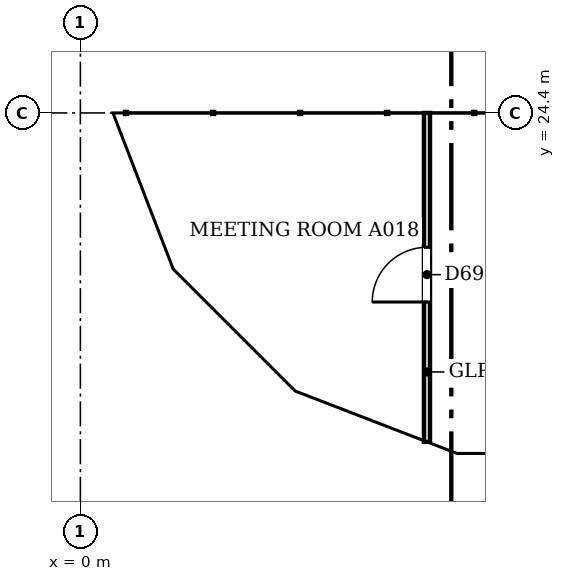
"""IFC4 building model, lengths in metres.
Left out: names, types, materials, properties, quantities, classifications, styles, units other than length and angle.
Written with IfcOpenShell. Run it as: python <this file> out.ifc"""

import sys

from ifc_helpers import new_model, si_unit, direction, frame, frame_2d, origin, place, context, subcontext, project, spatial, polyline, rectangle, outline, extrude, faceted_brep, source, transform, mapped, element, fill, save


model = new_model("IFC4")
c1 = context("Model", 3, precision=1e-05, world=origin(), true_north=direction((0.0, 1.0)))
c2 = subcontext(c1, "Body", "Model", "MODEL_VIEW")
j1 = project(units=[si_unit("LENGTHUNIT", "METRE"), si_unit("PLANEANGLEUNIT", "RADIAN")], contexts=[c1])
p1 = place(None, origin())
s1 = spatial("IfcSite", under=j1, at=p1, CompositionType="ELEMENT")
p2 = place(p1, origin())
s2 = spatial("IfcBuilding", under=s1, at=p2, CompositionType="ELEMENT")
p3 = place(p2, frame((0.0, 0.0, 228.3)))
s3 = spatial("IfcBuildingStorey", under=s2, at=p3, CompositionType="ELEMENT", Elevation=228.3)
m1 = source(origin(), c2, "Body", "Brep", [
    faceted_brep([(3.05, -0.25, 0.0), (6.053, -0.25, 3.8), (3.05, -0.25, 7.6), (0.0, -0.25, 3.8), (0.0, 0.25, 3.8), (3.05, 0.25, 7.6), (6.007, 0.25, 3.859), (6.007, 0.25, 3.741), (3.05, 0.25, 0.0), (6.053, 0.0, 3.8)], [[[0, 1, 2, 3]], [[4, 5, 6, 7, 8]], [[8, 7, 9, 1, 0]], [[6, 5, 2, 1, 9]], [[5, 4, 3, 2]], [[4, 8, 0, 3]], [[9, 7, 6]]]),
])
p4 = place(p3, frame((0.25, 30.5, -3.8), z_axis=(0.0, 0.0, 1.0), x_axis=(0.0, -1.0, 0.0)))
e1 = element("IfcWall", 1, at=p4, inside=s3, PredefinedType="SOLIDWALL", context=c2, shape_type="MappedRepresentation", body=[
    mapped(m1, transform((0.0, 0.0, 0.0), scale=1.0)),
])
m2 = source(origin(), c2, "Body", "SweptSolid", [
    extrude(outline(polyline([(3.049, 0.401), (5.735, 3.8), (3.049, 7.199), (0.321, 3.8), (3.049, 0.401)])), frame((0.0, 0.26, 0.0), z_axis=(0.0, -1.0, 0.0), x_axis=(1.0, 0.0, 0.0)), (0.0, 0.0, 1.0), 0.52),
])
p5 = place(p4, origin())
e2 = element("IfcOpeningElement", 2, at=p5, cuts=e1, PredefinedType="OPENING", context=c2, shape_type="MappedRepresentation", body=[
    mapped(m2, transform((0.0, 0.0, 0.0), scale=1.0)),
])
m3 = source(origin(), c2, "Body", "Brep", [
    faceted_brep([(2.95, -0.25, 0.0), (3.003, -0.25, 0.068), (3.003, -0.25, 7.532), (2.95, -0.25, 7.6), (0.0, -0.25, 3.8), (0.047, 0.25, 3.86), (2.898, 0.25, 7.532), (2.898, 0.25, 0.068), (0.047, 0.25, 3.74), (2.95, 0.0, 0.0), (2.95, 0.0, 7.6), (0.0, 0.0, 3.8)], [[[0, 1, 2, 3, 4]], [[5, 6, 7, 8]], [[1, 0, 9]], [[10, 3, 2]], [[6, 5, 11, 4, 3, 10]], [[8, 7, 9, 0, 4, 11]], [[8, 11, 5]], [[1, 9, 7, 6, 10, 2]]]),
])
p6 = place(p3, frame((0.25, 24.447, -3.8), z_axis=(0.0, 0.0, 1.0), x_axis=(0.35992665181, -0.932980602862, 0.0)))
e3 = element("IfcWall", 3, at=p6, inside=s3, PredefinedType="SOLIDWALL", context=c2, shape_type="MappedRepresentation", body=[
    mapped(m3, transform((0.0, 0.0, 0.0), scale=1.0)),
])
m4 = source(origin(), c2, "Body", "SweptSolid", [
    extrude(outline(polyline([(2.75, 6.935), (0.316, 3.8), (2.75, 0.665), (2.75, 6.935)])), frame((0.0, 0.26, 0.0), z_axis=(0.0, -1.0, 0.0), x_axis=(1.0, 0.0, 0.0)), (0.0, 0.0, 1.0), 0.52),
])
p7 = place(p6, origin())
e4 = element("IfcOpeningElement", 4, at=p7, cuts=e3, PredefinedType="OPENING", context=c2, shape_type="MappedRepresentation", body=[
    mapped(m4, transform((0.0, 0.0, 0.0), scale=1.0)),
])
m5 = source(origin(), c2, "Body", "Brep", [
    faceted_brep([(0.053, -0.25, 0.0), (2.997, -0.25, 3.8), (0.053, -0.25, 7.6), (0.0, -0.25, 7.532), (0.0, -0.25, 0.068), (0.106, 0.25, 7.532), (2.944, 0.25, 3.868), (2.944, 0.25, 3.732), (0.106, 0.25, 0.068), (2.997, 0.0, 3.8), (0.053, 0.0, 0.0), (0.053, 0.0, 7.6)], [[[0, 1, 2, 3, 4]], [[5, 6, 7, 8]], [[8, 7, 9, 1, 0, 10]], [[6, 5, 11, 2, 1, 9]], [[3, 2, 11]], [[10, 0, 4]], [[8, 10, 4, 3, 11, 5]], [[9, 7, 6]]]),
])
p8 = place(p3, frame((1.274, 21.731, -3.8), z_axis=(0.0, 0.0, 1.0), x_axis=(0.707147509625, -0.707066050402, 0.0)))
e5 = element("IfcWall", 5, at=p8, inside=s3, PredefinedType="SOLIDWALL", context=c2, shape_type="MappedRepresentation", body=[
    mapped(m5, transform((0.0, 0.0, 0.0), scale=1.0)),
])
m6 = source(origin(), c2, "Body", "SweptSolid", [
    extrude(outline(polyline([(0.253, 0.666), (2.681, 3.8), (0.253, 6.934), (0.253, 0.666)])), frame((0.0, 0.26, 0.0), z_axis=(0.0, -1.0, 0.0), x_axis=(1.0, 0.0, 0.0)), (0.0, 0.0, 1.0), 0.52),
])
p9 = place(p8, origin())
e6 = element("IfcOpeningElement", 6, at=p9, cuts=e5, PredefinedType="OPENING", context=c2, shape_type="MappedRepresentation", body=[
    mapped(m6, transform((0.0, 0.0, 0.0), scale=1.0)),
])
m7 = source(origin(), c2, "Body", "Brep", [
    faceted_brep([(2.95, -0.25, 0.0), (2.997, -0.25, 0.059), (2.997, -0.25, 7.541), (2.95, -0.25, 7.6), (0.0, -0.25, 3.8), (0.053, 0.25, 3.868), (2.904, 0.25, 7.54), (2.904, 0.25, 0.06), (0.053, 0.25, 3.732), (2.95, 0.0, 0.0), (2.95, 0.0, 7.6), (0.0, 0.0, 3.8)], [[[0, 1, 2, 3, 4]], [[5, 6, 7, 8]], [[1, 0, 9]], [[10, 3, 2]], [[6, 5, 11, 4, 3, 10]], [[8, 7, 9, 0, 4, 11]], [[8, 11, 5]], [[1, 9, 7, 6, 10, 2]]]),
])
p10 = place(p3, frame((3.394, 19.612, -3.8), z_axis=(0.0, 0.0, 1.0), x_axis=(0.932990326376, -0.359901446078, 0.0)))
e7 = element("IfcWall", 7, at=p10, inside=s3, PredefinedType="SOLIDWALL", context=c2, shape_type="MappedRepresentation", body=[
    mapped(m7, transform((0.0, 0.0, 0.0), scale=1.0)),
])
p11 = place(p10, origin())
e8 = element("IfcOpeningElement", 8, at=p11, cuts=e7, PredefinedType="OPENING", context=c2, shape_type="MappedRepresentation", body=[
    mapped(m4, transform((0.0, 0.0, 0.0), scale=1.0)),
])
m8 = source(origin(), c2, "Body", "Brep", [
    faceted_brep([(0.047, -0.25, 0.0), (3.05, -0.25, 3.8), (0.047, -0.25, 7.6), (0.0, -0.25, 7.54), (0.0, -0.25, 0.06), (0.093, 0.25, 7.541), (3.05, 0.25, 3.8), (0.093, 0.25, 0.059), (0.047, 0.0, 0.0), (0.047, 0.0, 7.6)], [[[0, 1, 2, 3, 4]], [[5, 6, 7]], [[7, 6, 1, 0, 8]], [[6, 5, 9, 2, 1]], [[3, 2, 9]], [[8, 0, 4]], [[7, 8, 4, 3, 9, 5]]]),
])
p12 = place(p3, frame((6.1, 18.55, -3.8), z_axis=(0.0, 0.0, 1.0), x_axis=(1.0, 0.0, 0.0)))
e9 = element("IfcWall", 9, at=p12, inside=s3, PredefinedType="SOLIDWALL", context=c2, shape_type="MappedRepresentation", body=[
    mapped(m8, transform((0.0, 0.0, 0.0), scale=1.0)),
])
m9 = source(origin(), c2, "Body", "SweptSolid", [
    extrude(outline(polyline([(0.247, 0.656), (2.731, 3.8), (0.247, 6.944), (0.247, 0.656)])), frame((0.0, 0.26, 0.0), z_axis=(0.0, -1.0, 0.0), x_axis=(1.0, 0.0, 0.0)), (0.0, 0.0, 1.0), 0.52),
])
p13 = place(p12, origin())
e10 = element("IfcOpeningElement", 10, at=p13, cuts=e9, PredefinedType="OPENING", context=c2, shape_type="MappedRepresentation", body=[
    mapped(m9, transform((0.0, 0.0, 0.0), scale=1.0)),
])
m10 = source(origin(), c2, "Body", "Brep", [
    faceted_brep([(3.003, -0.25, 0.0), (3.05, -0.25, 0.06), (3.05, -0.25, 3.8), (0.0, -0.25, 3.8), (0.0, 0.25, 3.8), (2.957, 0.25, 3.8), (2.957, 0.25, 0.059), (3.003, 0.0, 0.0)], [[[0, 1, 2, 3]], [[4, 5, 6]], [[1, 0, 7]], [[5, 4, 3, 2]], [[4, 6, 7, 0, 3]], [[1, 7, 6, 5, 2]]]),
])
p14 = place(p3, frame((0.25, 27.45, 0.0), z_axis=(0.0, 0.0, 1.0), x_axis=(0.0, -1.0, 0.0)))
e11 = element("IfcWall", 11, at=p14, inside=s3, PredefinedType="SOLIDWALL", context=c2, shape_type="MappedRepresentation", body=[
    mapped(m10, transform((0.0, 0.0, 0.0), scale=1.0)),
])
m11 = source(origin(), c2, "Body", "SweptSolid", [
    extrude(outline(polyline([(2.803, 3.55), (0.516, 3.55), (2.803, 0.656), (2.803, 3.55)])), frame((0.0, 0.26, 0.0), z_axis=(0.0, -1.0, 0.0), x_axis=(1.0, 0.0, 0.0)), (0.0, 0.0, 1.0), 0.52),
])
p15 = place(p14, origin())
e12 = element("IfcOpeningElement", 12, at=p15, cuts=e11, PredefinedType="OPENING", context=c2, shape_type="MappedRepresentation", body=[
    mapped(m11, transform((0.0, 0.0, 0.0), scale=1.0)),
])
m12 = source(origin(), c2, "Body", "Brep", [
    faceted_brep([(0.047, -0.25, 0.0), (2.997, -0.25, 3.8), (0.0, -0.25, 3.8), (0.0, -0.25, 0.059), (0.093, 0.25, 3.8), (2.944, 0.25, 3.8), (2.944, 0.25, 3.732), (0.093, 0.25, 0.06), (2.997, 0.0, 3.8), (0.047, 0.0, 0.0)], [[[0, 1, 2, 3]], [[4, 5, 6, 7]], [[7, 6, 8, 1, 0, 9]], [[5, 4, 2, 1, 8]], [[9, 0, 3]], [[7, 9, 3, 2, 4]], [[6, 5, 8]]]),
])
p16 = place(p3, frame((0.233, 24.49, 0.0), z_axis=(0.0, 0.0, 1.0), x_axis=(0.359901446078, -0.932990326376, 0.0)))
e13 = element("IfcWall", 13, at=p16, inside=s3, PredefinedType="SOLIDWALL", context=c2, shape_type="MappedRepresentation", body=[
    mapped(m12, transform((0.0, 0.0, 0.0), scale=1.0)),
])
m13 = source(origin(), c2, "Body", "SweptSolid", [
    extrude(outline(polyline([(0.247, 0.665), (2.487, 3.55), (0.247, 3.55), (0.247, 0.665)])), frame((0.0, 0.26, 0.0), z_axis=(0.0, -1.0, 0.0), x_axis=(1.0, 0.0, 0.0)), (0.0, 0.0, 1.0), 0.52),
])
p17 = place(p16, origin())
e14 = element("IfcOpeningElement", 14, at=p17, cuts=e13, PredefinedType="OPENING", context=c2, shape_type="MappedRepresentation", body=[
    mapped(m13, transform((0.0, 0.0, 0.0), scale=1.0)),
])
m14 = source(origin(), c2, "Body", "Brep", [
    faceted_brep([(2.944, -0.25, 0.0), (2.997, -0.25, 0.068), (2.997, -0.25, 3.8), (0.0, -0.25, 3.8), (0.053, 0.25, 3.8), (2.891, 0.25, 3.8), (2.891, 0.25, 0.068), (0.053, 0.25, 3.732), (2.944, 0.0, 0.0), (0.0, 0.0, 3.8)], [[[0, 1, 2, 3]], [[4, 5, 6, 7]], [[1, 0, 8]], [[5, 4, 9, 3, 2]], [[7, 6, 8, 0, 3, 9]], [[7, 9, 4]], [[1, 8, 6, 5, 2]]]),
])
p18 = place(p3, frame((1.312, 21.694, 0.0), z_axis=(0.0, 0.0, 1.0), x_axis=(0.707066050402, -0.707147509625, 0.0)))
e15 = element("IfcWall", 15, at=p18, inside=s3, PredefinedType="SOLIDWALL", context=c2, shape_type="MappedRepresentation", body=[
    mapped(m14, transform((0.0, 0.0, 0.0), scale=1.0)),
])
m15 = source(origin(), c2, "Body", "SweptSolid", [
    extrude(outline(polyline([(2.744, 3.55), (0.51, 3.55), (2.744, 0.666), (2.744, 3.55)])), frame((0.0, 0.26, 0.0), z_axis=(0.0, -1.0, 0.0), x_axis=(1.0, 0.0, 0.0)), (0.0, 0.0, 1.0), 0.52),
])
p19 = place(p18, origin())
e16 = element("IfcOpeningElement", 16, at=p19, cuts=e15, PredefinedType="OPENING", context=c2, shape_type="MappedRepresentation", body=[
    mapped(m15, transform((0.0, 0.0, 0.0), scale=1.0)),
])
m16 = source(origin(), c2, "Body", "Brep", [
    faceted_brep([(0.053, -0.25, 0.0), (3.003, -0.25, 3.8), (0.0, -0.25, 3.8), (0.0, -0.25, 0.068), (0.106, 0.25, 3.8), (2.957, 0.25, 3.8), (2.957, 0.25, 3.74), (0.106, 0.25, 0.068), (3.003, 0.0, 3.8), (0.053, 0.0, 0.0)], [[[0, 1, 2, 3]], [[4, 5, 6, 7]], [[7, 6, 8, 1, 0, 9]], [[5, 4, 2, 1, 8]], [[9, 0, 3]], [[7, 9, 3, 2, 4]], [[6, 5, 8]]]),
])
p20 = place(p3, frame((3.344, 19.631, 0.0), z_axis=(0.0, 0.0, 1.0), x_axis=(0.933007896601, -0.359855894603, 0.0)))
e17 = element("IfcWall", 17, at=p20, inside=s3, PredefinedType="SOLIDWALL", context=c2, shape_type="MappedRepresentation", body=[
    mapped(m16, transform((0.0, 0.0, 0.0), scale=1.0)),
])
m17 = source(origin(), c2, "Body", "SweptSolid", [
    extrude(outline(polyline([(0.253, 0.665), (2.493, 3.55), (0.253, 3.55), (0.253, 0.665)])), frame((0.0, 0.26, 0.0), z_axis=(0.0, -1.0, 0.0), x_axis=(1.0, 0.0, 0.0)), (0.0, 0.0, 1.0), 0.52),
])
p21 = place(p20, origin())
e18 = element("IfcOpeningElement", 18, at=p21, cuts=e17, PredefinedType="OPENING", context=c2, shape_type="MappedRepresentation", body=[
    mapped(m17, transform((0.0, 0.0, 0.0), scale=1.0)),
])
m18 = source(origin(), c2, "Body", "Brep", [
    faceted_brep([(3.003, -0.25, 0.0), (6.053, -0.25, 3.8), (0.0, -0.25, 3.8), (0.047, 0.25, 3.8), (6.053, 0.25, 3.8), (3.003, 0.25, 0.0), (0.047, 0.25, 3.741), (0.0, 0.0, 3.8)], [[[0, 1, 2]], [[3, 4, 5, 6]], [[5, 4, 1, 0]], [[4, 3, 7, 2, 1]], [[6, 5, 0, 2, 7]], [[6, 7, 3]]]),
])
p22 = place(p3, frame((6.146, 18.55, 0.0), z_axis=(0.0, 0.0, 1.0), x_axis=(1.0, 0.0, 0.0)))
e19 = element("IfcWall", 19, at=p22, inside=s3, PredefinedType="SOLIDWALL", context=c2, shape_type="MappedRepresentation", body=[
    mapped(m18, transform((0.0, 0.0, 0.0), scale=1.0)),
])
m19 = source(origin(), c2, "Body", "SweptSolid", [
    extrude(outline(polyline([(3.005, 0.401), (5.532, 3.55), (0.516, 3.55), (3.005, 0.401)])), frame((0.0, 0.26, 0.0), z_axis=(0.0, -1.0, 0.0), x_axis=(1.0, 0.0, 0.0)), (0.0, 0.0, 1.0), 0.52),
])
p23 = place(p22, origin())
e20 = element("IfcOpeningElement", 20, at=p23, cuts=e19, PredefinedType="OPENING", context=c2, shape_type="MappedRepresentation", body=[
    mapped(m19, transform((0.0, 0.0, 0.0), scale=1.0)),
])
p24 = place(p3, frame((5.7, 18.99, 0.0), z_axis=(0.0, 0.0, 1.0), x_axis=(0.0, 1.0, 0.0)))
e21 = element("IfcWall", 21, at=p24, inside=s3, PredefinedType="PARTITIONING", context=c2, shape_type="SweptSolid", body=[
    extrude(rectangle(XDim=5.41, YDim=0.1, at=frame_2d((2.705, 0.0))), origin(), (0.0, 0.0, 1.0), 2.888),
])
m20 = source(origin(), c2, "Body", "SweptSolid", [
    extrude(rectangle(XDim=0.9, YDim=2.1, at=frame_2d((0.45, 1.05))), frame((0.0, 0.06, 0.0), z_axis=(0.0, -1.0, 0.0), x_axis=(1.0, 0.0, 0.0)), (0.0, 0.0, 1.0), 0.12),
])
p25 = place(p24, frame((2.3, 0.0, 0.0)))
e22 = element("IfcOpeningElement", 22, at=p25, cuts=e21, PredefinedType="OPENING", context=c2, shape_type="MappedRepresentation", body=[
    mapped(m20, transform((0.0, 0.0, 0.0), scale=1.0)),
])
m21 = source(origin(), c2, "Body", "SweptSolid", [
    extrude(rectangle(XDim=0.9, YDim=2.1, at=frame_2d((0.45, 1.05))), frame((0.0, 0.025, 0.0), z_axis=(0.0, -1.0, 0.0), x_axis=(1.0, 0.0, 0.0)), (0.0, 0.0, 1.0), 0.05),
])
p26 = place(p25, origin())
e23 = element("IfcDoor", 23, at=p26, inside=s3, OperationType="SINGLE_SWING_LEFT", PredefinedType="DOOR", context=c2, shape_type="MappedRepresentation", body=[
    mapped(m21, transform((0.0, 0.0, 0.0), scale=1.0)),
])
fill(e22, e23)
save(model, sys.argv[1])
